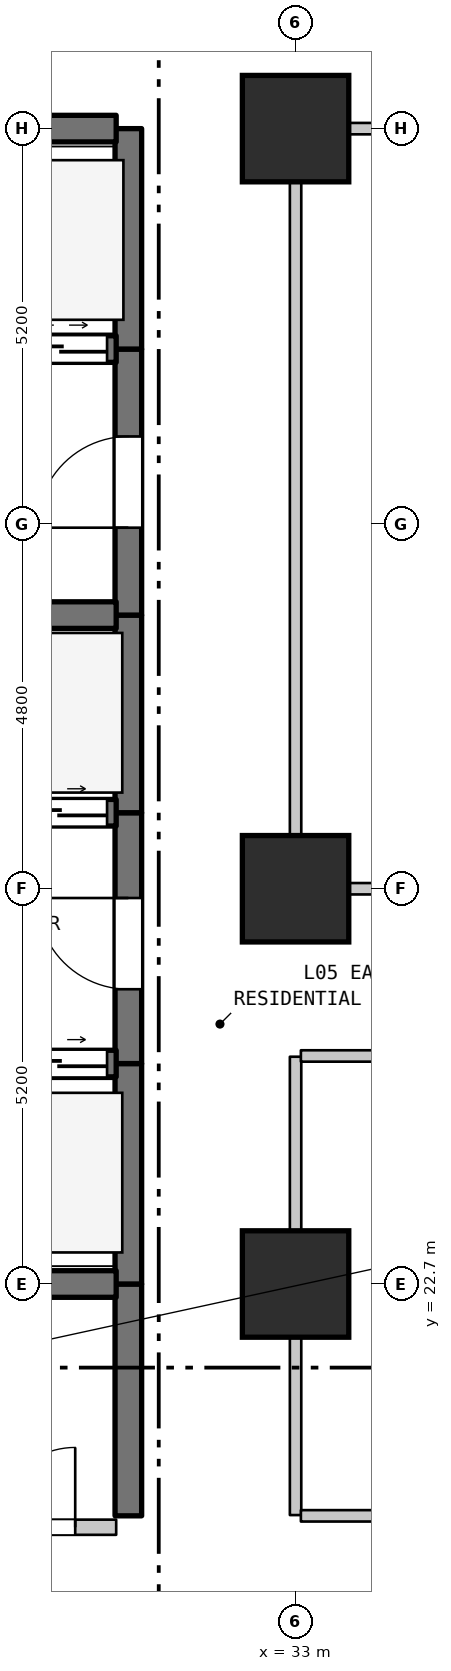
"""IFC4 building model, lengths in metres.
Left out: names, types, materials, properties, quantities, classifications, styles, units other than length and angle.
Written with IfcOpenShell. Run it as: python <this file> out.ifc"""

import sys

from ifc_helpers import new_model, si_unit, direction, frame, frame_2d, origin, origin_2d, place, context, subcontext, project, spatial, rectangle, extrude, element, fill, save


model = new_model("IFC4")
c1 = context("Model", 3, precision=1e-05, world=origin(), true_north=direction((0.0, 1.0)))
c2 = subcontext(c1, "Body", "Model", "MODEL_VIEW")
j1 = project(units=[si_unit("LENGTHUNIT", "METRE"), si_unit("PLANEANGLEUNIT", "RADIAN")], contexts=[c1])
p1 = place(None, origin())
s1 = spatial("IfcSite", under=j1, at=p1, CompositionType="ELEMENT")
p2 = place(p1, origin())
s2 = spatial("IfcBuilding", under=s1, at=p2, CompositionType="ELEMENT")
p3 = place(p2, frame((0.0, 0.0, 27.7)))
s3 = spatial("IfcBuildingStorey", under=s2, at=p3, CompositionType="ELEMENT", Elevation=27.7)
for number, where, z_axis, x_axis in (
    (1, (33.0, 22.7, 0.0), (0.0, 0.0, 1.0), (1.0, 0.0, 0.0)),
    (2, (33.0, 27.9, 0.0), (0.0, 0.0, 1.0), (1.0, 0.0, 0.0)),
    (3, (33.0, 37.9, 0.0), (0.0, 0.0, 1.0), (1.0, 0.0, 0.0)),
):
    element("IfcColumn", number, at=place(p3, frame(where, z_axis=z_axis, x_axis=x_axis)), inside=s3, PredefinedType="COLUMN", context=c2, shape_type="SweptSolid", body=[
        extrude(rectangle(XDim=1.4, YDim=1.4, at=origin_2d()), origin(), (0.0, 0.0, 1.0), 3.7),
    ])
p4 = place(p3, frame((30.8, 19.65, 0.0), z_axis=(0.0, 0.0, 1.0), x_axis=(0.0, 1.0, 0.0)))
e4 = element("IfcWall", 4, at=p4, inside=s3, PredefinedType="SHEAR", context=c2, shape_type="SweptSolid", body=[
    extrude(rectangle(XDim=3.05, YDim=0.35, at=frame_2d((1.525, 0.0))), origin(), (0.0, 0.0, 1.0), 3.385),
])
p5 = place(p3, frame((30.8, 22.7, 0.0), z_axis=(0.0, 0.0, 1.0), x_axis=(0.0, 1.0, 0.0)))
e5 = element("IfcWall", 5, at=p5, inside=s3, PredefinedType="SHEAR", context=c2, shape_type="SweptSolid", body=[
    extrude(rectangle(XDim=2.9, YDim=0.35, at=frame_2d((1.45, 0.0))), origin(), (0.0, 0.0, 1.0), 3.385),
])
p6 = place(p3, frame((30.8, 25.6, 0.0), z_axis=(0.0, 0.0, 1.0), x_axis=(0.0, 1.0, 0.0)))
e6 = element("IfcWall", 6, at=p6, inside=s3, PredefinedType="SHEAR", context=c2, shape_type="SweptSolid", body=[
    extrude(rectangle(XDim=3.3, YDim=0.35, at=frame_2d((1.65, 0.0))), origin(), (0.0, 0.0, 1.0), 3.385),
])
p7 = place(p6, frame((0.978, 0.0, 0.0)))
e7 = element("IfcOpeningElement", 7, at=p7, cuts=e6, PredefinedType="OPENING", context=c2, shape_type="SweptSolid", body=[
    extrude(rectangle(XDim=1.2, YDim=2.2, at=frame_2d((0.6, 1.1))), frame((0.0, 0.185, 0.0), z_axis=(0.0, -1.0, 0.0), x_axis=(1.0, 0.0, 0.0)), (0.0, 0.0, 1.0), 0.37),
])
p8 = place(p3, frame((30.8, 28.9, 0.0), z_axis=(0.0, 0.0, 1.0), x_axis=(0.0, 1.0, 0.0)))
e8 = element("IfcWall", 8, at=p8, inside=s3, PredefinedType="SHEAR", context=c2, shape_type="SweptSolid", body=[
    extrude(rectangle(XDim=2.6, YDim=0.35, at=frame_2d((1.3, 0.0))), origin(), (0.0, 0.0, 1.0), 3.385),
])
p9 = place(p3, frame((30.8, 31.5, 0.0), z_axis=(0.0, 0.0, 1.0), x_axis=(0.0, 1.0, 0.0)))
e9 = element("IfcWall", 9, at=p9, inside=s3, PredefinedType="SHEAR", context=c2, shape_type="SweptSolid", body=[
    extrude(rectangle(XDim=3.5, YDim=0.35, at=frame_2d((1.75, 0.0))), origin(), (0.0, 0.0, 1.0), 3.385),
])
p10 = place(p9, frame((1.15, 0.0, 0.0)))
e10 = element("IfcOpeningElement", 10, at=p10, cuts=e9, PredefinedType="OPENING", context=c2, shape_type="SweptSolid", body=[
    extrude(rectangle(XDim=1.2, YDim=2.2, at=frame_2d((0.6, 1.1))), frame((0.0, 0.185, 0.0), z_axis=(0.0, -1.0, 0.0), x_axis=(1.0, 0.0, 0.0)), (0.0, 0.0, 1.0), 0.37),
])
p11 = place(p3, frame((30.8, 35.0, 0.0), z_axis=(0.0, 0.0, 1.0), x_axis=(0.0, 1.0, 0.0)))
e11 = element("IfcWall", 11, at=p11, inside=s3, PredefinedType="SHEAR", context=c2, shape_type="SweptSolid", body=[
    extrude(rectangle(XDim=2.9, YDim=0.35, at=frame_2d((1.45, 0.0))), origin(), (0.0, 0.0, 1.0), 3.385),
])
p12 = place(p3, frame((33.0, 19.66, 0.0), z_axis=(0.0, 0.0, 1.0), x_axis=(0.0, 1.0, 0.0)))
e12 = element("IfcWall", 12, at=p12, inside=s3, PredefinedType="STANDARD", context=c2, shape_type="SweptSolid", body=[
    extrude(rectangle(XDim=6.03, YDim=0.15, at=frame_2d((3.015, 0.0))), origin(), (0.0, 0.0, 1.0), 2.885),
])
p13 = place(p3, frame((33.0, 27.91, 0.0), z_axis=(0.0, 0.0, 1.0), x_axis=(0.0, 1.0, 0.0)))
e13 = element("IfcWall", 13, at=p13, inside=s3, PredefinedType="STANDARD", context=c2, shape_type="SweptSolid", body=[
    extrude(rectangle(XDim=9.98, YDim=0.15, at=frame_2d((4.99, 0.0))), origin(), (0.0, 0.0, 1.0), 2.885),
])
p14 = place(p3, frame((28.585, 19.5, 0.0), z_axis=(0.0, 0.0, 1.0), x_axis=(1.0, 0.0, 0.0)))
e14 = element("IfcWall", 14, at=p14, inside=s3, PredefinedType="STANDARD", context=c2, shape_type="SweptSolid", body=[
    extrude(rectangle(XDim=2.055, YDim=0.2, at=frame_2d((1.027, 0.0))), origin(), (0.0, 0.0, 1.0), 3.385),
])
p15 = place(p14, frame((0.466, 0.0, 0.0)))
e15 = element("IfcOpeningElement", 15, at=p15, cuts=e14, PredefinedType="OPENING", context=c2, shape_type="SweptSolid", body=[
    extrude(rectangle(XDim=1.05, YDim=2.15, at=frame_2d((0.525, 1.075))), frame((0.0, 0.11, 0.0), z_axis=(0.0, -1.0, 0.0), x_axis=(1.0, 0.0, 0.0)), (0.0, 0.0, 1.0), 0.22),
])
p16 = place(p3, frame((33.07, 19.65, 0.0), z_axis=(0.0, 0.0, 1.0), x_axis=(1.0, 0.0, 0.0)))
e16 = element("IfcWall", 16, at=p16, inside=s3, PredefinedType="STANDARD", context=c2, shape_type="SweptSolid", body=[
    extrude(rectangle(XDim=33.27, YDim=0.15, at=frame_2d((16.635, 0.0))), origin(), (0.0, 0.0, 1.0), 3.385),
])
p17 = place(p16, frame((16.065, 0.0, 0.0)))
e17 = element("IfcOpeningElement", 17, at=p17, cuts=e16, PredefinedType="OPENING", context=c2, shape_type="SweptSolid", body=[
    extrude(rectangle(XDim=1.0, YDim=2.15, at=frame_2d((0.5, 1.075))), frame((0.0, 0.085, 0.0), z_axis=(0.0, -1.0, 0.0), x_axis=(1.0, 0.0, 0.0)), (0.0, 0.0, 1.0), 0.17),
])
p18 = place(p3, frame((28.585, 22.7, 0.0), z_axis=(0.0, 0.0, 1.0), x_axis=(1.0, 0.0, 0.0)))
e18 = element("IfcWall", 18, at=p18, inside=s3, PredefinedType="SHEAR", context=c2, shape_type="SweptSolid", body=[
    extrude(rectangle(XDim=2.055, YDim=0.35, at=frame_2d((1.027, 0.0))), origin(), (0.0, 0.0, 1.0), 3.385),
])
p19 = place(p3, frame((27.46, 25.6, 0.0), z_axis=(0.0, 0.0, 1.0), x_axis=(1.0, 0.0, 0.0)))
e19 = element("IfcWall", 19, at=p19, inside=s3, PredefinedType="SHEAR", context=c2, shape_type="SweptSolid", body=[
    extrude(rectangle(XDim=3.18, YDim=0.35, at=frame_2d((1.59, 0.0))), origin(), (0.0, 0.0, 1.0), 3.385),
])
p20 = place(p19, frame((0.12, 0.0, 0.0)))
e20 = element("IfcOpeningElement", 20, at=p20, cuts=e19, PredefinedType="OPENING", context=c2, shape_type="SweptSolid", body=[
    extrude(rectangle(XDim=1.25, YDim=2.2, at=frame_2d((0.625, 1.1))), frame((0.0, 0.185, 0.0), z_axis=(0.0, -1.0, 0.0), x_axis=(1.0, 0.0, 0.0)), (0.0, 0.0, 1.0), 0.37),
])
p21 = place(p19, frame((1.81, 0.0, 0.0)))
e21 = element("IfcOpeningElement", 21, at=p21, cuts=e19, PredefinedType="OPENING", context=c2, shape_type="SweptSolid", body=[
    extrude(rectangle(XDim=1.25, YDim=2.2, at=frame_2d((0.625, 1.1))), frame((0.0, 0.185, 0.0), z_axis=(0.0, -1.0, 0.0), x_axis=(1.0, 0.0, 0.0)), (0.0, 0.0, 1.0), 0.37),
])
p22 = place(p3, frame((33.07, 25.7, 0.0), z_axis=(0.0, 0.0, 1.0), x_axis=(1.0, 0.0, 0.0)))
e22 = element("IfcWall", 22, at=p22, inside=s3, PredefinedType="STANDARD", context=c2, shape_type="SweptSolid", body=[
    extrude(rectangle(XDim=30.87, YDim=0.15, at=frame_2d((15.435, 0.0))), origin(), (0.0, 0.0, 1.0), 3.385),
])
p23 = place(p3, frame((33.07, 27.9, 0.0), z_axis=(0.0, 0.0, 1.0), x_axis=(1.0, 0.0, 0.0)))
e23 = element("IfcWall", 23, at=p23, inside=s3, PredefinedType="STANDARD", context=c2, shape_type="SweptSolid", body=[
    extrude(rectangle(XDim=30.87, YDim=0.15, at=frame_2d((15.435, 0.0))), origin(), (0.0, 0.0, 1.0), 2.885),
])
p24 = place(p23, frame((14.935, 0.0, 0.0)))
e24 = element("IfcOpeningElement", 24, at=p24, cuts=e23, PredefinedType="OPENING", context=c2, shape_type="SweptSolid", body=[
    extrude(rectangle(XDim=1.0, YDim=2.15, at=frame_2d((0.5, 1.075))), frame((0.0, 0.085, 0.0), z_axis=(0.0, -1.0, 0.0), x_axis=(1.0, 0.0, 0.0)), (0.0, 0.0, 1.0), 0.17),
])
p25 = place(p3, frame((27.46, 28.9, 0.0), z_axis=(0.0, 0.0, 1.0), x_axis=(1.0, 0.0, 0.0)))
e25 = element("IfcWall", 25, at=p25, inside=s3, PredefinedType="SHEAR", context=c2, shape_type="SweptSolid", body=[
    extrude(rectangle(XDim=3.18, YDim=0.35, at=frame_2d((1.59, 0.0))), origin(), (0.0, 0.0, 1.0), 3.385),
])
p26 = place(p25, frame((0.12, 0.0, 0.0)))
e26 = element("IfcOpeningElement", 26, at=p26, cuts=e25, PredefinedType="OPENING", context=c2, shape_type="SweptSolid", body=[
    extrude(rectangle(XDim=1.25, YDim=2.2, at=frame_2d((0.625, 1.1))), frame((0.0, 0.185, 0.0), z_axis=(0.0, -1.0, 0.0), x_axis=(1.0, 0.0, 0.0)), (0.0, 0.0, 1.0), 0.37),
])
p27 = place(p25, frame((1.81, 0.0, 0.0)))
e27 = element("IfcOpeningElement", 27, at=p27, cuts=e25, PredefinedType="OPENING", context=c2, shape_type="SweptSolid", body=[
    extrude(rectangle(XDim=1.25, YDim=2.2, at=frame_2d((0.625, 1.1))), frame((0.0, 0.185, 0.0), z_axis=(0.0, -1.0, 0.0), x_axis=(1.0, 0.0, 0.0)), (0.0, 0.0, 1.0), 0.37),
])
p28 = place(p3, frame((27.46, 31.5, 0.0), z_axis=(0.0, 0.0, 1.0), x_axis=(1.0, 0.0, 0.0)))
e28 = element("IfcWall", 28, at=p28, inside=s3, PredefinedType="SHEAR", context=c2, shape_type="SweptSolid", body=[
    extrude(rectangle(XDim=3.18, YDim=0.35, at=frame_2d((1.59, 0.0))), origin(), (0.0, 0.0, 1.0), 3.385),
])
p29 = place(p3, frame((19.16, 35.0, 0.0), z_axis=(0.0, 0.0, 1.0), x_axis=(1.0, 0.0, 0.0)))
e29 = element("IfcWall", 29, at=p29, inside=s3, PredefinedType="SHEAR", context=c2, shape_type="SweptSolid", body=[
    extrude(rectangle(XDim=11.48, YDim=0.35, at=frame_2d((5.74, 0.0))), origin(), (0.0, 0.0, 1.0), 3.385),
])
p30 = place(p29, frame((0.365, 0.0, 0.0)))
e30 = element("IfcOpeningElement", 30, at=p30, cuts=e29, PredefinedType="OPENING", context=c2, shape_type="SweptSolid", body=[
    extrude(rectangle(XDim=1.35, YDim=2.2, at=frame_2d((0.675, 1.1))), frame((0.0, 0.185, 0.0), z_axis=(0.0, -1.0, 0.0), x_axis=(1.0, 0.0, 0.0)), (0.0, 0.0, 1.0), 0.37),
])
p31 = place(p29, frame((2.765, 0.0, 0.0)))
e31 = element("IfcOpeningElement", 31, at=p31, cuts=e29, PredefinedType="OPENING", context=c2, shape_type="SweptSolid", body=[
    extrude(rectangle(XDim=1.35, YDim=2.2, at=frame_2d((0.675, 1.1))), frame((0.0, 0.185, 0.0), z_axis=(0.0, -1.0, 0.0), x_axis=(1.0, 0.0, 0.0)), (0.0, 0.0, 1.0), 0.37),
])
p32 = place(p29, frame((4.915, 0.0, 0.0)))
e32 = element("IfcOpeningElement", 32, at=p32, cuts=e29, PredefinedType="OPENING", context=c2, shape_type="SweptSolid", body=[
    extrude(rectangle(XDim=1.2, YDim=2.2, at=frame_2d((0.6, 1.1))), frame((0.0, 0.185, 0.0), z_axis=(0.0, -1.0, 0.0), x_axis=(1.0, 0.0, 0.0)), (0.0, 0.0, 1.0), 0.37),
])
p33 = place(p29, frame((6.665, 0.0, 0.0)))
e33 = element("IfcOpeningElement", 33, at=p33, cuts=e29, PredefinedType="OPENING", context=c2, shape_type="SweptSolid", body=[
    extrude(rectangle(XDim=1.2, YDim=2.2, at=frame_2d((0.6, 1.1))), frame((0.0, 0.185, 0.0), z_axis=(0.0, -1.0, 0.0), x_axis=(1.0, 0.0, 0.0)), (0.0, 0.0, 1.0), 0.37),
])
p34 = place(p29, frame((8.415, 0.0, 0.0)))
e34 = element("IfcOpeningElement", 34, at=p34, cuts=e29, PredefinedType="OPENING", context=c2, shape_type="SweptSolid", body=[
    extrude(rectangle(XDim=1.2, YDim=2.2, at=frame_2d((0.6, 1.1))), frame((0.0, 0.185, 0.0), z_axis=(0.0, -1.0, 0.0), x_axis=(1.0, 0.0, 0.0)), (0.0, 0.0, 1.0), 0.37),
])
p35 = place(p29, frame((10.16, 0.0, 0.0)))
e35 = element("IfcOpeningElement", 35, at=p35, cuts=e29, PredefinedType="OPENING", context=c2, shape_type="SweptSolid", body=[
    extrude(rectangle(XDim=1.2, YDim=2.2, at=frame_2d((0.6, 1.1))), frame((0.0, 0.185, 0.0), z_axis=(0.0, -1.0, 0.0), x_axis=(1.0, 0.0, 0.0)), (0.0, 0.0, 1.0), 0.37),
])
p36 = place(p3, frame((19.16, 37.9, 0.0), z_axis=(0.0, 0.0, 1.0), x_axis=(1.0, 0.0, 0.0)))
e36 = element("IfcWall", 36, at=p36, inside=s3, PredefinedType="SHEAR", context=c2, shape_type="SweptSolid", body=[
    extrude(rectangle(XDim=11.48, YDim=0.35, at=frame_2d((5.74, 0.0))), origin(), (0.0, 0.0, 1.0), 3.385),
])
p37 = place(p3, frame((33.07, 37.9, 0.0), z_axis=(0.0, 0.0, 1.0), x_axis=(1.0, 0.0, 0.0)))
e37 = element("IfcWall", 37, at=p37, inside=s3, PredefinedType="STANDARD", context=c2, shape_type="SweptSolid", body=[
    extrude(rectangle(XDim=26.935, YDim=0.15, at=frame_2d((13.467, 0.0))), origin(), (0.0, 0.0, 1.0), 3.385),
])
p38 = place(p7, origin())
e38 = element("IfcDoor", 38, at=p38, inside=s3, OperationType="SINGLE_SWING_RIGHT", PredefinedType="DOOR", context=c2, shape_type="SweptSolid", body=[
    extrude(rectangle(XDim=1.2, YDim=2.2, at=frame_2d((0.6, 1.1))), frame((0.0, 0.025, 0.0), z_axis=(0.0, -1.0, 0.0), x_axis=(1.0, 0.0, 0.0)), (0.0, 0.0, 1.0), 0.05),
])
fill(e7, e38)
p39 = place(p10, origin())
e39 = element("IfcDoor", 39, at=p39, inside=s3, OperationType="SINGLE_SWING_LEFT", PredefinedType="DOOR", context=c2, shape_type="SweptSolid", body=[
    extrude(rectangle(XDim=1.2, YDim=2.2, at=frame_2d((0.6, 1.1))), frame((0.0, 0.025, 0.0), z_axis=(0.0, -1.0, 0.0), x_axis=(1.0, 0.0, 0.0)), (0.0, 0.0, 1.0), 0.05),
])
fill(e10, e39)
p40 = place(p15, origin())
e40 = element("IfcDoor", 40, at=p40, inside=s3, OperationType="SINGLE_SWING_RIGHT", PredefinedType="DOOR", context=c2, shape_type="SweptSolid", body=[
    extrude(rectangle(XDim=1.05, YDim=2.15, at=frame_2d((0.525, 1.075))), frame((0.0, 0.025, 0.0), z_axis=(0.0, -1.0, 0.0), x_axis=(1.0, 0.0, 0.0)), (0.0, 0.0, 1.0), 0.05),
])
fill(e15, e40)
p41 = place(p21, origin())
e41 = element("IfcDoor", 41, at=p41, inside=s3, OperationType="DOUBLE_DOOR_SLIDING", PredefinedType="DOOR", context=c2, shape_type="SweptSolid", body=[
    extrude(rectangle(XDim=1.25, YDim=2.2, at=frame_2d((0.625, 1.1))), frame((0.0, 0.025, 0.0), z_axis=(0.0, -1.0, 0.0), x_axis=(1.0, 0.0, 0.0)), (0.0, 0.0, 1.0), 0.05),
])
fill(e21, e41)
p42 = place(p27, origin())
e42 = element("IfcDoor", 42, at=p42, inside=s3, OperationType="DOUBLE_DOOR_SLIDING", PredefinedType="DOOR", context=c2, shape_type="SweptSolid", body=[
    extrude(rectangle(XDim=1.25, YDim=2.2, at=frame_2d((0.625, 1.1))), frame((0.0, 0.025, 0.0), z_axis=(0.0, -1.0, 0.0), x_axis=(1.0, 0.0, 0.0)), (0.0, 0.0, 1.0), 0.05),
])
fill(e27, e42)
p43 = place(p35, origin())
e43 = element("IfcDoor", 43, at=p43, inside=s3, OperationType="DOUBLE_DOOR_SLIDING", PredefinedType="DOOR", context=c2, shape_type="SweptSolid", body=[
    extrude(rectangle(XDim=1.2, YDim=2.2, at=frame_2d((0.6, 1.1))), frame((0.0, 0.025, 0.0), z_axis=(0.0, -1.0, 0.0), x_axis=(1.0, 0.0, 0.0)), (0.0, 0.0, 1.0), 0.05),
])
fill(e35, e43)
save(model, sys.argv[1])
